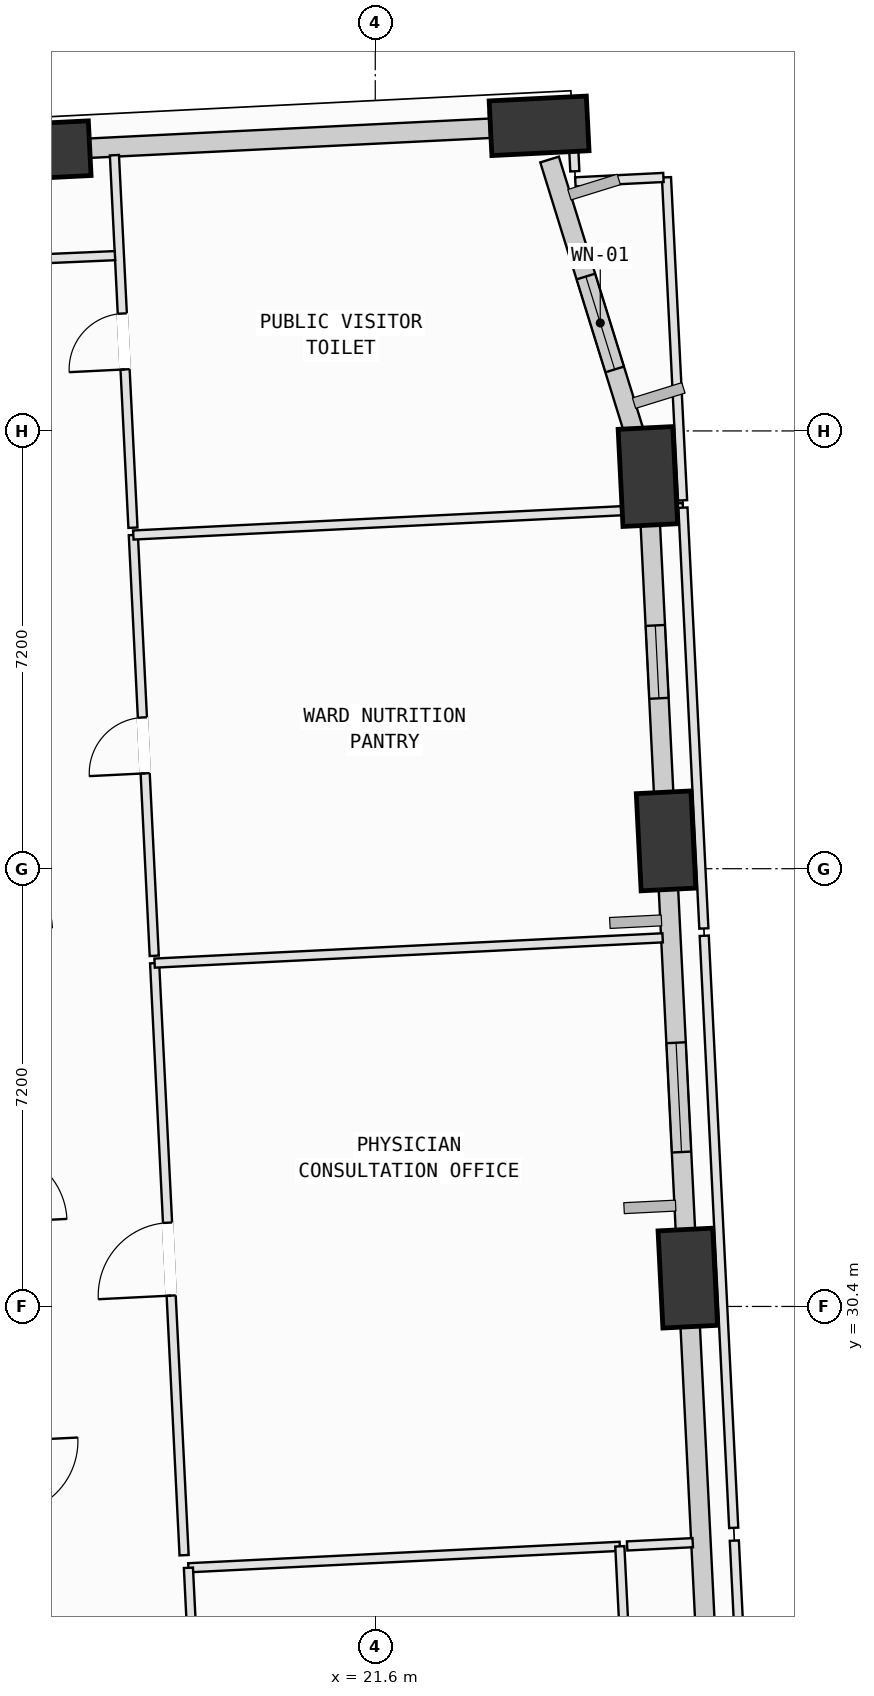
"""IFC4 building model, lengths in metres.
Left out: names, types, materials, properties, quantities, classifications, styles, units other than length and angle.
Written with IfcOpenShell. Run it as: python <this file> out.ifc"""

import sys

from ifc_helpers import new_model, si_unit, direction, frame, frame_2d, origin, origin_2d, place, context, subcontext, project, spatial, rectangle, extrude, element, fill, save


model = new_model("IFC4")
c1 = context("Model", 3, precision=1e-05, world=origin(), true_north=direction((0.0, 1.0)))
c2 = subcontext(c1, "Body", "Model", "MODEL_VIEW")
j1 = project(units=[si_unit("LENGTHUNIT", "METRE"), si_unit("PLANEANGLEUNIT", "RADIAN")], contexts=[c1])
p1 = place(None, origin())
s1 = spatial("IfcSite", under=j1, at=p1, CompositionType="ELEMENT")
p2 = place(p1, origin())
s2 = spatial("IfcBuilding", under=s1, at=p2, CompositionType="ELEMENT")
p3 = place(p2, frame((0.0, 0.0, 35.0)))
s3 = spatial("IfcBuildingStorey", under=s2, at=p3, CompositionType="ELEMENT", Elevation=35.0)
p4 = place(p3, frame((26.74, 30.866, 0.002), z_axis=(-0.024844684533, -0.028629378491, 0.999281291898), x_axis=(0.616586966732, 0.786375969317, 0.03785957392)))
e1 = element("IfcColumn", 1, at=p4, inside=s3, PredefinedType="COLUMN", context=c2, shape_type="SweptSolid", body=[
    extrude(rectangle(XDim=1.6, YDim=0.9, at=origin_2d()), origin(), (0.0, 0.0, 1.0), 4.0),
])
p5 = place(p3, frame((26.382, 38.057, 0.002), z_axis=(-0.05462737064, -0.030301119652, 0.998046939039), x_axis=(0.847573936457, 0.526996927987, 0.062391186333)))
e2 = element("IfcColumn", 2, at=p5, inside=s3, PredefinedType="COLUMN", context=c2, shape_type="SweptSolid", body=[
    extrude(rectangle(XDim=1.6, YDim=0.9, at=origin_2d()), origin(), (0.0, 0.0, 1.0), 4.004),
])
p6 = place(p3, frame((26.083, 44.05, 0.002), z_axis=(-0.079245481907, -0.031710365648, 0.996350644255), x_axis=(0.905423019564, 0.415862685284, 0.085248945052)))
e3 = element("IfcColumn", 3, at=p6, inside=s3, PredefinedType="COLUMN", context=c2, shape_type="SweptSolid", body=[
    extrude(rectangle(XDim=1.6, YDim=0.9, at=origin_2d()), origin(), (0.0, 0.0, 1.0), 4.011),
])
p7 = place(p3, frame((24.294, 49.818, 0.002), z_axis=(-0.102793283922, -0.039162237525, 0.993931516722), x_axis=(0.401759547153, -0.915728863869, 0.005469382782)))
e4 = element("IfcColumn", 4, at=p7, inside=s3, PredefinedType="COLUMN", context=c2, shape_type="SweptSolid", body=[
    extrude(rectangle(XDim=1.6, YDim=0.9, at=origin_2d()), origin(), (0.0, 0.0, 1.0), 4.021),
])
p8 = place(p3, frame((16.104, 49.41, 0.002), z_axis=(-0.100619939354, -0.072797919978, 0.992258076637), x_axis=(0.625414370544, -0.780268372995, 0.006175048206)))
e5 = element("IfcColumn", 5, at=p8, inside=s3, PredefinedType="COLUMN", context=c2, shape_type="SweptSolid", body=[
    extrude(rectangle(XDim=1.6, YDim=0.9, at=origin_2d()), origin(), (0.0, 0.0, 1.0), 4.028),
])
p9 = place(p3, frame((27.098, 23.679, 0.0), z_axis=(0.0, 0.0, 1.0), x_axis=(-0.049717778481, 0.998763306546, 0.0)))
e6 = element("IfcWall", 6, at=p9, inside=s3, PredefinedType="SOLIDWALL", context=c2, shape_type="SweptSolid", body=[
    extrude(rectangle(XDim=6.536, YDim=0.32, at=frame_2d((3.268, 0.0))), origin(), (0.0, 0.0, 1.0), 3.165),
])
p10 = place(p3, frame((26.712, 31.417, 0.0), z_axis=(0.0, 0.0, 1.0), x_axis=(-0.049710193148, 0.99876368411, 0.0)))
e7 = element("IfcWall", 7, at=p10, inside=s3, PredefinedType="SOLIDWALL", context=c2, shape_type="SweptSolid", body=[
    extrude(rectangle(XDim=5.997, YDim=0.32, at=frame_2d((2.998, 0.0))), origin(), (0.0, 0.0, 1.0), 3.165),
])
p11 = place(p10, frame((1.525, 0.0, 0.75)))
e8 = element("IfcOpeningElement", 8, at=p11, cuts=e7, PredefinedType="OPENING", context=c2, shape_type="SweptSolid", body=[
    extrude(rectangle(XDim=1.8, YDim=2.05, at=frame_2d((0.9, 1.025))), frame((0.0, 0.17, 0.0), z_axis=(0.0, -1.0, 0.0), x_axis=(1.0, 0.0, 0.0)), (0.0, 0.0, 1.0), 0.34),
])
p12 = place(p3, frame((26.355, 38.599, 0.0), z_axis=(0.0, 0.0, 1.0), x_axis=(-0.049730290966, 0.998762683604, 0.0)))
e9 = element("IfcWall", 9, at=p12, inside=s3, PredefinedType="SOLIDWALL", context=c2, shape_type="SweptSolid", body=[
    extrude(rectangle(XDim=4.816, YDim=0.32, at=frame_2d((2.408, 0.0))), origin(), (0.0, 0.0, 1.0), 3.165),
])
p13 = place(p12, frame((1.806, 0.0, 0.75)))
e10 = element("IfcOpeningElement", 10, at=p13, cuts=e9, PredefinedType="OPENING", context=c2, shape_type="SweptSolid", body=[
    extrude(rectangle(XDim=1.2, YDim=1.75, at=frame_2d((0.6, 0.875))), frame((0.0, 0.17, 0.0), z_axis=(0.0, -1.0, 0.0), x_axis=(1.0, 0.0, 0.0)), (0.0, 0.0, 1.0), 0.34),
])
p14 = place(p3, frame((24.467, 49.264, 0.0), z_axis=(0.0, 0.0, 1.0), x_axis=(0.296218585313, -0.955120175536, 0.0)))
e11 = element("IfcWall", 11, at=p14, inside=s3, PredefinedType="SOLIDWALL", context=c2, shape_type="SweptSolid", body=[
    extrude(rectangle(XDim=4.889, YDim=0.32, at=frame_2d((2.445, 0.0))), origin(), (0.0, 0.0, 1.0), 3.165),
])
p15 = place(p14, frame((2.015, 0.0, 0.75)))
e12 = element("IfcOpeningElement", 12, at=p15, cuts=e11, PredefinedType="OPENING", context=c2, shape_type="SweptSolid", body=[
    extrude(rectangle(XDim=1.6, YDim=1.95, at=frame_2d((0.8, 0.975))), frame((0.0, 0.17, 0.0), z_axis=(0.0, -1.0, 0.0), x_axis=(1.0, 0.0, 0.0)), (0.0, 0.0, 1.0), 0.34),
])
p16 = place(p3, frame((16.487, 49.43, 0.0), z_axis=(0.0, 0.0, 1.0), x_axis=(0.998763528672, 0.049713316063, 0.0)))
e13 = element("IfcWall", 13, at=p16, inside=s3, PredefinedType="SOLIDWALL", context=c2, shape_type="SweptSolid", body=[
    extrude(rectangle(XDim=7.003, YDim=0.32, at=frame_2d((3.501, 0.0))), origin(), (0.0, 0.0, 1.0), 3.165),
])
p17 = place(p3, frame((18.527, 26.102, 0.0), z_axis=(0.0, 0.0, 1.0), x_axis=(0.998764394094, 0.049695926288, 0.0)))
e14 = element("IfcWall", 14, at=p17, inside=s3, PredefinedType="PARTITIONING", context=c2, shape_type="SweptSolid", body=[
    extrude(rectangle(XDim=7.104, YDim=0.15, at=frame_2d((3.552, 0.0))), origin(), (0.0, 0.0, 1.0), 3.78),
])
p18 = place(p3, frame((25.622, 26.455, 0.0), z_axis=(0.0, 0.0, 1.0), x_axis=(0.049639526669, -0.998767198797, 0.0)))
e15 = element("IfcWall", 15, at=p18, inside=s3, PredefinedType="PARTITIONING", context=c2, shape_type="SweptSolid", body=[
    extrude(rectangle(XDim=5.882, YDim=0.15, at=frame_2d((2.941, 0.0))), origin(), (0.0, 0.0, 1.0), 3.78),
])
p19 = place(p3, frame((18.802, 20.58, 0.0), z_axis=(0.0, 0.0, 1.0), x_axis=(-0.049721781713, 0.99876310726, 0.0)))
e16 = element("IfcWall", 16, at=p19, inside=s3, PredefinedType="PARTITIONING", context=c2, shape_type="SweptSolid", body=[
    extrude(rectangle(XDim=5.529, YDim=0.15, at=frame_2d((2.764, 0.0))), origin(), (0.0, 0.0, 1.0), 3.78),
])
p20 = place(p3, frame((25.742, 26.461, 0.0), z_axis=(0.0, 0.0, 1.0), x_axis=(0.998752338878, 0.049937616944, 0.0)))
e17 = element("IfcWall", 17, at=p20, inside=s3, PredefinedType="PARTITIONING", context=c2, shape_type="SweptSolid", body=[
    extrude(rectangle(XDim=1.081, YDim=0.15, at=frame_2d((0.54, 0.0))), origin(), (0.0, 0.0, 1.0), 3.78),
])
p21 = place(p3, frame((27.505, 26.549, 0.0), z_axis=(0.0, 0.0, 1.0), x_axis=(0.049860704893, -0.998756181512, 0.0)))
e18 = element("IfcWall", 18, at=p21, inside=s3, PredefinedType="PARTITIONING", context=c2, shape_type="SweptSolid", body=[
    extrude(rectangle(XDim=2.85, YDim=0.15, at=frame_2d((1.425, 0.0))), origin(), (0.0, 0.0, 1.0), 3.78),
])
p22 = place(p3, frame((18.456, 26.309, 0.0), z_axis=(0.0, 0.0, 1.0), x_axis=(-0.049754032713, 0.998761501175, 0.0)))
e19 = element("IfcWall", 19, at=p22, inside=s3, PredefinedType="PARTITIONING", context=c2, shape_type="SweptSolid", body=[
    extrude(rectangle(XDim=9.75, YDim=0.15, at=frame_2d((4.875, 0.0))), origin(), (0.0, 0.0, 1.0), 3.78),
])
p23 = place(p22, frame((4.275, 0.0, 0.0)))
e20 = element("IfcOpeningElement", 20, at=p23, cuts=e19, PredefinedType="OPENING", context=c2, shape_type="SweptSolid", body=[
    extrude(rectangle(XDim=1.2, YDim=2.15, at=frame_2d((0.6, 1.075))), frame((0.0, 0.085, 0.0), z_axis=(0.0, -1.0, 0.0), x_axis=(1.0, 0.0, 0.0)), (0.0, 0.0, 1.0), 0.17),
])
p24 = place(p3, frame((17.971, 36.047, 0.0), z_axis=(0.0, 0.0, 1.0), x_axis=(0.998764101431, 0.049701807748, 0.0)))
e21 = element("IfcWall", 21, at=p24, inside=s3, PredefinedType="PARTITIONING", context=c2, shape_type="SweptSolid", body=[
    extrude(rectangle(XDim=8.365, YDim=0.15, at=frame_2d((4.183, 0.0))), origin(), (0.0, 0.0, 1.0), 3.78),
])
p25 = place(p3, frame((27.01, 36.497, 0.0), z_axis=(0.0, 0.0, 1.0), x_axis=(0.049754032713, -0.998761501175, 0.0)))
e22 = element("IfcWall", 22, at=p25, inside=s3, PredefinedType="PARTITIONING", context=c2, shape_type="SweptSolid", body=[
    extrude(rectangle(XDim=9.75, YDim=0.15, at=frame_2d((4.875, 0.0))), origin(), (0.0, 0.0, 1.0), 3.78),
])
p26 = place(p3, frame((17.965, 36.167, 0.0), z_axis=(0.0, 0.0, 1.0), x_axis=(-0.049642400939, 0.998767055939, 0.0)))
e23 = element("IfcWall", 23, at=p26, inside=s3, PredefinedType="PARTITIONING", context=c2, shape_type="SweptSolid", body=[
    extrude(rectangle(XDim=6.929, YDim=0.15, at=frame_2d((3.465, 0.0))), origin(), (0.0, 0.0, 1.0), 3.78),
])
p27 = place(p26, frame((3.005, 0.0, 0.0)))
e24 = element("IfcOpeningElement", 24, at=p27, cuts=e23, PredefinedType="OPENING", context=c2, shape_type="SweptSolid", body=[
    extrude(rectangle(XDim=0.92, YDim=2.1, at=frame_2d((0.46, 1.05))), frame((0.0, 0.085, 0.0), z_axis=(0.0, -1.0, 0.0), x_axis=(1.0, 0.0, 0.0)), (0.0, 0.0, 1.0), 0.17),
])
p28 = place(p3, frame((17.621, 43.088, 0.0), z_axis=(0.0, 0.0, 1.0), x_axis=(0.998763172644, 0.049720468316, 0.0)))
e25 = element("IfcWall", 25, at=p28, inside=s3, PredefinedType="PARTITIONING", context=c2, shape_type="SweptSolid", body=[
    extrude(rectangle(XDim=8.411, YDim=0.15, at=frame_2d((4.206, 0.0))), origin(), (0.0, 0.0, 1.0), 3.78),
])
p29 = place(p3, frame((26.199, 43.515, 0.0), z_axis=(0.0, 0.0, 1.0), x_axis=(0.998736458519, 0.050254217987, 0.0)))
e26 = element("IfcWall", 26, at=p29, inside=s3, PredefinedType="PARTITIONING", context=c2, shape_type="SweptSolid", body=[
    extrude(rectangle(XDim=0.461, YDim=0.15, at=frame_2d((0.231, 0.0))), origin(), (0.0, 0.0, 1.0), 3.78),
])
p30 = place(p3, frame((26.66, 43.538, 0.0), z_axis=(0.0, 0.0, 1.0), x_axis=(0.049640654138, -0.99876714276, 0.0)))
e27 = element("IfcWall", 27, at=p30, inside=s3, PredefinedType="PARTITIONING", context=c2, shape_type="SweptSolid", body=[
    extrude(rectangle(XDim=6.93, YDim=0.15, at=frame_2d((3.465, 0.0))), origin(), (0.0, 0.0, 1.0), 3.78),
])
p31 = place(p3, frame((26.389, 48.971, 0.0), z_axis=(0.0, 0.0, 1.0), x_axis=(0.049841478508, -0.998757141161, 0.0)))
e28 = element("IfcWall", 28, at=p31, inside=s3, PredefinedType="PARTITIONING", context=c2, shape_type="SweptSolid", body=[
    extrude(rectangle(XDim=5.32, YDim=0.15, at=frame_2d((2.66, 0.0))), origin(), (0.0, 0.0, 1.0), 3.78),
])
p32 = place(p3, frame((17.615, 43.208, 0.0), z_axis=(0.0, 0.0, 1.0), x_axis=(-0.049707364413, 0.998763824897, 0.0)))
e29 = element("IfcWall", 29, at=p32, inside=s3, PredefinedType="PARTITIONING", context=c2, shape_type="SweptSolid", body=[
    extrude(rectangle(XDim=6.135, YDim=0.15, at=frame_2d((3.067, 0.0))), origin(), (0.0, 0.0, 1.0), 3.78),
])
p33 = place(p32, frame((2.607, 0.0, 0.0)))
e30 = element("IfcOpeningElement", 30, at=p33, cuts=e29, PredefinedType="OPENING", context=c2, shape_type="SweptSolid", body=[
    extrude(rectangle(XDim=0.92, YDim=2.1, at=frame_2d((0.46, 1.05))), frame((0.0, 0.085, 0.0), z_axis=(0.0, -1.0, 0.0), x_axis=(1.0, 0.0, 0.0)), (0.0, 0.0, 1.0), 0.17),
])
p34 = place(p3, frame((23.472, 49.967, 0.0), z_axis=(0.0, 0.0, 1.0), x_axis=(0.998760806784, 0.049767969938, 0.0)))
e31 = element("IfcWall", 31, at=p34, inside=s3, PredefinedType="PARTITIONING", context=c2, shape_type="SweptSolid", body=[
    extrude(rectangle(XDim=1.364, YDim=0.15, at=frame_2d((0.682, 0.0))), origin(), (0.0, 0.0, 1.0), 3.165),
])
p35 = place(p3, frame((24.837, 49.985, 0.0), z_axis=(0.0, 0.0, 1.0), x_axis=(0.049352181131, -0.998781438663, 0.0)))
e32 = element("IfcWall", 32, at=p35, inside=s3, PredefinedType="PARTITIONING", context=c2, shape_type="SweptSolid", body=[
    extrude(rectangle(XDim=0.915, YDim=0.15, at=frame_2d((0.458, 0.0))), origin(), (0.0, 0.0, 1.0), 3.78),
])
p36 = place(p3, frame((24.891, 48.897, 0.0), z_axis=(0.0, 0.0, 1.0), x_axis=(0.998765323198, 0.0496772501, 0.0)))
e33 = element("IfcWall", 33, at=p36, inside=s3, PredefinedType="PARTITIONING", context=c2, shape_type="SweptSolid", body=[
    extrude(rectangle(XDim=1.45, YDim=0.15, at=frame_2d((0.725, 0.0))), origin(), (0.0, 0.0, 1.0), 3.78),
])
p37 = place(p3, frame((17.319, 47.683, 0.0), z_axis=(0.0, 0.0, 1.0), x_axis=(-0.999041126527, -0.043781588673, 0.0)))
e34 = element("IfcWall", 34, at=p37, inside=s3, PredefinedType="PARTITIONING", context=c2, shape_type="SweptSolid", body=[
    extrude(rectangle(XDim=2.677, YDim=0.15, at=frame_2d((1.338, 0.0))), origin(), (0.0, 0.0, 1.0), 3.78),
])
p38 = place(p11, origin())
e35 = element("IfcWindow", 35, at=p38, inside=s3, PartitioningType="SINGLE_PANEL", PredefinedType="WINDOW", context=c2, shape_type="SweptSolid", body=[
    extrude(rectangle(XDim=1.8, YDim=2.05, at=frame_2d((0.9, 1.025))), frame((0.0, 0.03, 0.0), z_axis=(0.0, -1.0, 0.0), x_axis=(1.0, 0.0, 0.0)), (0.0, 0.0, 1.0), 0.06),
])
fill(e8, e35)
p39 = place(p13, origin())
e36 = element("IfcWindow", 36, at=p39, inside=s3, PartitioningType="SINGLE_PANEL", PredefinedType="WINDOW", context=c2, shape_type="SweptSolid", body=[
    extrude(rectangle(XDim=1.2, YDim=1.75, at=frame_2d((0.6, 0.875))), frame((0.0, 0.03, 0.0), z_axis=(0.0, -1.0, 0.0), x_axis=(1.0, 0.0, 0.0)), (0.0, 0.0, 1.0), 0.06),
])
fill(e10, e36)
p40 = place(p15, origin())
e37 = element("IfcWindow", 37, at=p40, inside=s3, PartitioningType="SINGLE_PANEL", PredefinedType="WINDOW", context=c2, shape_type="SweptSolid", body=[
    extrude(rectangle(XDim=1.6, YDim=1.95, at=frame_2d((0.8, 0.975))), frame((0.0, 0.03, 0.0), z_axis=(0.0, -1.0, 0.0), x_axis=(1.0, 0.0, 0.0)), (0.0, 0.0, 1.0), 0.06),
])
fill(e12, e37)
p41 = place(p23, origin())
e38 = element("IfcDoor", 38, at=p41, inside=s3, OperationType="SINGLE_SWING_LEFT", PredefinedType="DOOR", context=c2, shape_type="SweptSolid", body=[
    extrude(rectangle(XDim=1.2, YDim=2.15, at=frame_2d((0.6, 1.075))), frame((0.0, 0.025, 0.0), z_axis=(0.0, -1.0, 0.0), x_axis=(1.0, 0.0, 0.0)), (0.0, 0.0, 1.0), 0.05),
])
fill(e20, e38)
p42 = place(p27, origin())
e39 = element("IfcDoor", 39, at=p42, inside=s3, OperationType="SINGLE_SWING_LEFT", PredefinedType="DOOR", context=c2, shape_type="SweptSolid", body=[
    extrude(rectangle(XDim=0.92, YDim=2.1, at=frame_2d((0.46, 1.05))), frame((0.0, 0.025, 0.0), z_axis=(0.0, -1.0, 0.0), x_axis=(1.0, 0.0, 0.0)), (0.0, 0.0, 1.0), 0.05),
])
fill(e24, e39)
p43 = place(p33, origin())
e40 = element("IfcDoor", 40, at=p43, inside=s3, OperationType="SINGLE_SWING_LEFT", PredefinedType="DOOR", context=c2, shape_type="SweptSolid", body=[
    extrude(rectangle(XDim=0.92, YDim=2.1, at=frame_2d((0.46, 1.05))), frame((0.0, 0.025, 0.0), z_axis=(0.0, -1.0, 0.0), x_axis=(1.0, 0.0, 0.0)), (0.0, 0.0, 1.0), 0.05),
])
fill(e30, e40)
save(model, sys.argv[1])
